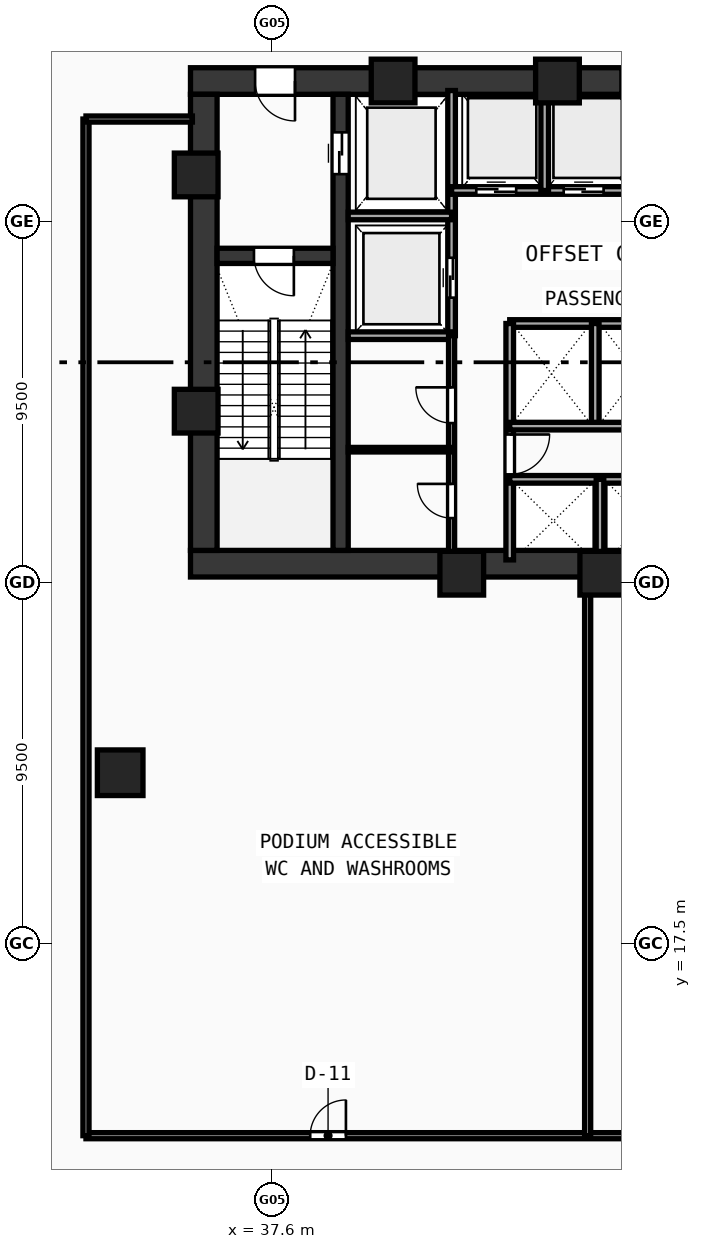
"""IFC4 building model, lengths in metres.
Left out: names, types, materials, properties, quantities, classifications, styles, units other than length and angle.
Written with IfcOpenShell. Run it as: python <this file> out.ifc"""

import sys

from ifc_helpers import new_model, si_unit, direction, frame, frame_2d, origin, origin_with_axes, origin_2d, place, context, subcontext, project, spatial, rectangle, hollow_rectangle, extrude, source, transform, mapped, element, fill, save


model = new_model("IFC4")
c1 = context("Model", 3, precision=1e-05, world=origin(), true_north=direction((0.0, 1.0)))
c2 = subcontext(c1, "Body", "Model", "MODEL_VIEW")
j1 = project(units=[si_unit("LENGTHUNIT", "METRE"), si_unit("PLANEANGLEUNIT", "RADIAN")], contexts=[c1])
p1 = place(None, origin())
s1 = spatial("IfcSite", under=j1, at=p1, CompositionType="ELEMENT")
p2 = place(p1, origin())
s2 = spatial("IfcBuilding", under=s1, at=p2, CompositionType="ELEMENT")
p3 = place(p2, frame((0.0, 0.0, 9.6)))
s3 = spatial("IfcBuildingStorey", under=s2, at=p3, CompositionType="ELEMENT", Elevation=9.6)
p4 = place(p3, frame((35.45, 27.5, 0.0), z_axis=(0.0, 0.0, 1.0), x_axis=(1.0, 0.0, 0.0)))
e1 = element("IfcWall", 1, at=p4, inside=s3, PredefinedType="SHEAR", context=c2, shape_type="SweptSolid", body=[
    extrude(rectangle(XDim=25.1, YDim=0.7, at=frame_2d((12.55, 0.0))), origin(), (0.0, 0.0, 1.0), 4.52),
])
p5 = place(p3, frame((35.45, 40.2, 0.0), z_axis=(0.0, 0.0, 1.0), x_axis=(1.0, 0.0, 0.0)))
e2 = element("IfcWall", 2, at=p5, inside=s3, PredefinedType="SHEAR", context=c2, shape_type="SweptSolid", body=[
    extrude(rectangle(XDim=11.35, YDim=0.7, at=frame_2d((5.675, 0.0))), origin(), (0.0, 0.0, 1.0), 4.52),
])
p6 = place(p5, frame((1.7, 0.0, 0.0)))
e3 = element("IfcOpeningElement", 3, at=p6, cuts=e2, PredefinedType="OPENING", context=c2, shape_type="SweptSolid", body=[
    extrude(rectangle(XDim=1.05, YDim=2.1, at=frame_2d((0.525, 1.05))), frame((0.0, 0.36, 0.0), z_axis=(0.0, -1.0, 0.0), x_axis=(1.0, 0.0, 0.0)), (0.0, 0.0, 1.0), 0.72),
])
p7 = place(p3, frame((35.8, 27.85, 0.0), z_axis=(0.0, 0.0, 1.0), x_axis=(0.0, 1.0, 0.0)))
e4 = element("IfcWall", 4, at=p7, inside=s3, PredefinedType="SHEAR", context=c2, shape_type="SweptSolid", body=[
    extrude(rectangle(XDim=12.0, YDim=0.7, at=frame_2d((6.0, 0.0))), origin(), (0.0, 0.0, 1.0), 4.52),
])
p8 = place(p3, frame((39.4, 27.85, 0.0), z_axis=(0.0, 0.0, 1.0), x_axis=(0.0, 1.0, 0.0)))
e5 = element("IfcWall", 5, at=p8, inside=s3, PredefinedType="SHEAR", context=c2, shape_type="SweptSolid", body=[
    extrude(rectangle(XDim=12.0, YDim=0.4, at=frame_2d((6.0, 0.0))), origin(), (0.0, 0.0, 1.0), 4.52),
])
p9 = place(p8, frame((9.9, 0.0, 0.0)))
e6 = element("IfcOpeningElement", 6, at=p9, cuts=e5, PredefinedType="OPENING", context=c2, shape_type="SweptSolid", body=[
    extrude(rectangle(XDim=1.1, YDim=2.1, at=frame_2d((0.55, 1.05))), frame((0.0, 0.21, 0.0), z_axis=(0.0, -1.0, 0.0), x_axis=(1.0, 0.0, 0.0)), (0.0, 0.0, 1.0), 0.42),
])
p10 = place(p3, frame((36.15, 35.6, 0.0), z_axis=(0.0, 0.0, 1.0), x_axis=(1.0, 0.0, 0.0)))
e7 = element("IfcWall", 7, at=p10, inside=s3, PredefinedType="SHEAR", context=c2, shape_type="SweptSolid", body=[
    extrude(rectangle(XDim=3.05, YDim=0.4, at=frame_2d((1.525, 0.0))), origin(), (0.0, 0.0, 1.0), 4.52),
])
p11 = place(p10, frame((0.97, 0.0, 0.0)))
e8 = element("IfcOpeningElement", 8, at=p11, cuts=e7, PredefinedType="OPENING", context=c2, shape_type="SweptSolid", body=[
    extrude(rectangle(XDim=1.05, YDim=2.1, at=frame_2d((0.525, 1.05))), frame((0.0, 0.21, 0.0), z_axis=(0.0, -1.0, 0.0), x_axis=(1.0, 0.0, 0.0)), (0.0, 0.0, 1.0), 0.42),
])
m1 = source(origin(), c2, "Body", "SweptSolid", [
    extrude(hollow_rectangle(XDim=1.15, YDim=1.15, WallThickness=0.048, at=origin_2d()), origin(), (0.0, 0.0, 1.0), 4.8),
])
for number, where, z_axis, x_axis in (
    (9, (42.588, 27.25, -0.28), (0.0, 0.0, 1.0), (1.0, 0.0, 0.0)),
    (10, (46.272, 27.25, -0.28), (0.0, 0.0, 1.0), (1.0, 0.0, 0.0)),
    (11, (45.106, 40.2, -0.28), (0.0, 0.0, 1.0), (1.0, 0.0, 0.0)),
    (12, (40.781, 40.2, -0.28), (0.0, 0.0, 1.0), (1.0, 0.0, 0.0)),
    (13, (35.6, 37.729, -0.28), (0.0, 0.0, 1.0), (1.0, 0.0, 0.0)),
    (14, (35.6, 31.513, -0.28), (0.0, 0.0, 1.0), (1.0, 0.0, 0.0)),
):
    element("IfcColumn", number, at=place(p3, frame(where, z_axis=z_axis, x_axis=x_axis)), inside=s3, PredefinedType="COLUMN", context=c2, shape_type="MappedRepresentation", body=[
        mapped(m1, transform((0.0, 0.0, 0.0), scale=1.0)),
    ])
m2 = source(origin(), c2, "Body", "SweptSolid", [
    extrude(hollow_rectangle(XDim=1.2, YDim=1.2, WallThickness=0.05, at=origin_2d()), origin(), (0.0, 0.0, 1.0), 4.8),
])
p12 = place(p3, frame((33.6, 22.0, -0.28), z_axis=(0.0, 0.0, 1.0), x_axis=(1.0, 0.0, 0.0)))
e15 = element("IfcColumn", 15, at=p12, inside=s3, PredefinedType="COLUMN", context=c2, shape_type="MappedRepresentation", body=[
    mapped(m2, transform((0.0, 0.0, 0.0), scale=1.0)),
])
p13 = place(p3, frame((42.32, 33.5, 0.0), z_axis=(0.0, 0.0, 1.0), x_axis=(0.0, 1.0, 0.0)))
e16 = element("IfcWall", 16, at=p13, inside=s3, PredefinedType="SOLIDWALL", context=c2, shape_type="SweptSolid", body=[
    extrude(rectangle(XDim=6.45, YDim=0.2, at=frame_2d((3.225, 0.0))), origin(), (0.0, 0.0, 1.0), 4.52),
])
p14 = place(p13, frame((1.0, 0.0, 0.0)))
e17 = element("IfcOpeningElement", 17, at=p14, cuts=e16, PredefinedType="OPENING", context=c2, shape_type="SweptSolid", body=[
    extrude(rectangle(XDim=1.05, YDim=2.1, at=frame_2d((0.525, 1.05))), frame((0.0, 0.11, 0.0), z_axis=(0.0, -1.0, 0.0), x_axis=(1.0, 0.0, 0.0)), (0.0, 0.0, 1.0), 0.22),
])
for number, where, z_axis, x_axis in (
    (18, (39.6, 36.65, 0.0), (0.0, 0.0, 1.0), (1.0, 0.0, 0.0)),
    (19, (39.6, 33.5, 0.0), (0.0, 0.0, 1.0), (1.0, 0.0, 0.0)),
):
    element("IfcWall", number, at=place(p3, frame(where, z_axis=z_axis, x_axis=x_axis)), inside=s3, PredefinedType="SOLIDWALL", context=c2, shape_type="SweptSolid", body=[
        extrude(rectangle(XDim=2.72, YDim=0.2, at=frame_2d((1.36, 0.0))), origin(), (0.0, 0.0, 1.0), 4.52),
    ])
p15 = place(p3, frame((42.32, 37.32, 0.0), z_axis=(0.0, 0.0, 1.0), x_axis=(1.0, 0.0, 0.0)))
e20 = element("IfcWall", 20, at=p15, inside=s3, PredefinedType="SOLIDWALL", context=c2, shape_type="SweptSolid", body=[
    extrude(rectangle(XDim=4.73, YDim=0.2, at=frame_2d((2.365, 0.0))), origin(), (0.0, 0.0, 1.0), 4.52),
])
p16 = place(p15, frame((0.65, 0.0, 0.0)))
e21 = element("IfcOpeningElement", 21, at=p16, cuts=e20, PredefinedType="OPENING", context=c2, shape_type="SweptSolid", body=[
    extrude(rectangle(XDim=1.05, YDim=2.1, at=frame_2d((0.525, 1.05))), frame((0.0, 0.11, 0.0), z_axis=(0.0, -1.0, 0.0), x_axis=(1.0, 0.0, 0.0)), (0.0, 0.0, 1.0), 0.22),
])
p17 = place(p15, frame((2.95, 0.0, 0.0)))
e22 = element("IfcOpeningElement", 22, at=p17, cuts=e20, PredefinedType="OPENING", context=c2, shape_type="SweptSolid", body=[
    extrude(rectangle(XDim=1.05, YDim=2.1, at=frame_2d((0.525, 1.05))), frame((0.0, 0.11, 0.0), z_axis=(0.0, -1.0, 0.0), x_axis=(1.0, 0.0, 0.0)), (0.0, 0.0, 1.0), 0.22),
])
p18 = place(p3, frame((44.77, 37.32, 0.0), z_axis=(0.0, 0.0, 1.0), x_axis=(0.0, 1.0, 0.0)))
e23 = element("IfcWall", 23, at=p18, inside=s3, PredefinedType="SOLIDWALL", context=c2, shape_type="SweptSolid", body=[
    extrude(rectangle(XDim=2.63, YDim=0.2, at=frame_2d((1.315, 0.0))), origin(), (0.0, 0.0, 1.0), 4.52),
])
p19 = place(p3, frame((43.85, 33.82, 0.0), z_axis=(0.0, 0.0, 1.0), x_axis=(1.0, 0.0, 0.0)))
e24 = element("IfcWall", 24, at=p19, inside=s3, PredefinedType="SOLIDWALL", context=c2, shape_type="SweptSolid", body=[
    extrude(rectangle(XDim=9.83, YDim=0.2, at=frame_2d((4.915, 0.0))), origin(), (0.0, 0.0, 1.0), 4.52),
])
p20 = place(p3, frame((43.85, 27.6, 0.0), z_axis=(0.0, 0.0, 1.0), x_axis=(0.0, 1.0, 0.0)))
e25 = element("IfcWall", 25, at=p20, inside=s3, PredefinedType="SOLIDWALL", context=c2, shape_type="SweptSolid", body=[
    extrude(rectangle(XDim=6.22, YDim=0.2, at=frame_2d((3.11, 0.0))), origin(), (0.0, 0.0, 1.0), 4.52),
])
p21 = place(p20, frame((2.25, 0.0, 0.0)))
e26 = element("IfcOpeningElement", 26, at=p21, cuts=e25, PredefinedType="OPENING", context=c2, shape_type="SweptSolid", body=[
    extrude(rectangle(XDim=1.05, YDim=2.1, at=frame_2d((0.525, 1.05))), frame((0.0, 0.11, 0.0), z_axis=(0.0, -1.0, 0.0), x_axis=(1.0, 0.0, 0.0)), (0.0, 0.0, 1.0), 0.22),
])
p22 = place(p3, frame((46.1, 31.12, 0.0), z_axis=(0.0, 0.0, 1.0), x_axis=(0.0, 1.0, 0.0)))
e27 = element("IfcWall", 27, at=p22, inside=s3, PredefinedType="SOLIDWALL", context=c2, shape_type="SweptSolid", body=[
    extrude(rectangle(XDim=2.7, YDim=0.2, at=frame_2d((1.35, 0.0))), origin(), (0.0, 0.0, 1.0), 4.52),
])
p23 = place(p3, frame((43.85, 29.72, 0.0), z_axis=(0.0, 0.0, 1.0), x_axis=(1.0, 0.0, 0.0)))
e28 = element("IfcWall", 28, at=p23, inside=s3, PredefinedType="SOLIDWALL", context=c2, shape_type="SweptSolid", body=[
    extrude(rectangle(XDim=7.2, YDim=0.2, at=frame_2d((3.6, 0.0))), origin(), (0.0, 0.0, 1.0), 4.52),
])
p24 = place(p3, frame((43.85, 31.12, 0.0), z_axis=(0.0, 0.0, 1.0), x_axis=(1.0, 0.0, 0.0)))
e29 = element("IfcWall", 29, at=p24, inside=s3, PredefinedType="SOLIDWALL", context=c2, shape_type="SweptSolid", body=[
    extrude(rectangle(XDim=9.83, YDim=0.2, at=frame_2d((4.915, 0.0))), origin(), (0.0, 0.0, 1.0), 4.52),
])
p25 = place(p3, frame((46.225, 27.6, 0.0), z_axis=(0.0, 0.0, 1.0), x_axis=(0.0, 1.0, 0.0)))
e30 = element("IfcWall", 30, at=p25, inside=s3, PredefinedType="SOLIDWALL", context=c2, shape_type="SweptSolid", body=[
    extrude(rectangle(XDim=2.12, YDim=0.2, at=frame_2d((1.06, 0.0))), origin(), (0.0, 0.0, 1.0), 4.52),
])
p26 = place(p3, frame((42.32, 27.6, 0.0), z_axis=(0.0, 0.0, 1.0), x_axis=(0.0, 1.0, 0.0)))
e31 = element("IfcWall", 31, at=p26, inside=s3, PredefinedType="PARTITIONING", context=c2, shape_type="SweptSolid", body=[
    extrude(rectangle(XDim=5.9, YDim=0.16, at=frame_2d((2.95, 0.0))), origin(), (0.0, 0.0, 1.0), 4.52),
])
p27 = place(p26, frame((1.1, 0.0, 0.0)))
e32 = element("IfcOpeningElement", 32, at=p27, cuts=e31, PredefinedType="OPENING", context=c2, shape_type="SweptSolid", body=[
    extrude(rectangle(XDim=0.9, YDim=2.1, at=frame_2d((0.45, 1.05))), frame((0.0, 0.09, 0.0), z_axis=(0.0, -1.0, 0.0), x_axis=(1.0, 0.0, 0.0)), (0.0, 0.0, 1.0), 0.18),
])
p28 = place(p26, frame((3.6, 0.0, 0.0)))
e33 = element("IfcOpeningElement", 33, at=p28, cuts=e31, PredefinedType="OPENING", context=c2, shape_type="SweptSolid", body=[
    extrude(rectangle(XDim=0.94, YDim=2.1, at=frame_2d((0.47, 1.05))), frame((0.0, 0.09, 0.0), z_axis=(0.0, -1.0, 0.0), x_axis=(1.0, 0.0, 0.0)), (0.0, 0.0, 1.0), 0.18),
])
p29 = place(p3, frame((39.6, 30.5, 0.0), z_axis=(0.0, 0.0, 1.0), x_axis=(1.0, 0.0, 0.0)))
e34 = element("IfcWall", 34, at=p29, inside=s3, PredefinedType="PARTITIONING", context=c2, shape_type="SweptSolid", body=[
    extrude(rectangle(XDim=2.72, YDim=0.12, at=frame_2d((1.36, 0.0))), origin(), (0.0, 0.0, 1.0), 4.52),
])
p30 = place(p3, frame((32.7, 12.45, 0.0), z_axis=(0.0, 0.0, 1.0), x_axis=(1.0, 0.0, 0.0)))
e35 = element("IfcWall", 35, at=p30, inside=s3, PredefinedType="PARTITIONING", context=c2, shape_type="SweptSolid", body=[
    extrude(rectangle(XDim=30.6, YDim=0.16, at=frame_2d((15.3, 0.0))), origin(), (0.0, 0.0, 1.0), 3.62),
])
p31 = place(p30, frame((16.2, 0.0, 0.0)))
e36 = element("IfcOpeningElement", 36, at=p31, cuts=e35, PredefinedType="OPENING", context=c2, shape_type="SweptSolid", body=[
    extrude(rectangle(XDim=0.92, YDim=2.1, at=frame_2d((0.46, 1.05))), frame((0.0, 0.09, 0.0), z_axis=(0.0, -1.0, 0.0), x_axis=(1.0, 0.0, 0.0)), (0.0, 0.0, 1.0), 0.18),
])
p32 = place(p30, frame((5.9, 0.0, 0.0)))
e37 = element("IfcOpeningElement", 37, at=p32, cuts=e35, PredefinedType="OPENING", context=c2, shape_type="SweptSolid", body=[
    extrude(rectangle(XDim=0.94, YDim=2.1, at=frame_2d((0.47, 1.05))), frame((0.0, 0.09, 0.0), z_axis=(0.0, -1.0, 0.0), x_axis=(1.0, 0.0, 0.0)), (0.0, 0.0, 1.0), 0.18),
])
p33 = place(p3, frame((32.7, 12.45, 0.0), z_axis=(0.0, 0.0, 1.0), x_axis=(0.0, 1.0, 0.0)))
e38 = element("IfcWall", 38, at=p33, inside=s3, PredefinedType="PARTITIONING", context=c2, shape_type="SweptSolid", body=[
    extrude(rectangle(XDim=26.75, YDim=0.16, at=frame_2d((13.375, 0.0))), origin(), (0.0, 0.0, 1.0), 3.62),
])
p34 = place(p3, frame((32.7, 39.2, 0.0), z_axis=(0.0, 0.0, 1.0), x_axis=(1.0, 0.0, 0.0)))
e39 = element("IfcWall", 39, at=p34, inside=s3, PredefinedType="PARTITIONING", context=c2, shape_type="SweptSolid", body=[
    extrude(rectangle(XDim=2.8, YDim=0.16, at=frame_2d((1.4, 0.0))), origin(), (0.0, 0.0, 1.0), 3.62),
])
p35 = place(p3, frame((45.9, 12.45, 0.0), z_axis=(0.0, 0.0, 1.0), x_axis=(0.0, 1.0, 0.0)))
e40 = element("IfcWall", 40, at=p35, inside=s3, PredefinedType="PARTITIONING", context=c2, shape_type="SweptSolid", body=[
    extrude(rectangle(XDim=15.05, YDim=0.16, at=frame_2d((7.525, 0.0))), origin(), (0.0, 0.0, 1.0), 3.62),
])
p36 = place(p3, frame((45.0, 34.4, 0.0), z_axis=(0.0, 0.0, 1.0), x_axis=(1.0, 0.0, 0.0)))
e41 = element("IfcWall", 41, at=p36, inside=s3, PredefinedType="MOVABLE", context=c2, shape_type="SweptSolid", body=[
    extrude(rectangle(XDim=6.0, YDim=0.11, at=frame_2d((3.0, 0.0))), origin(), (0.0, 0.0, 1.0), 2.5),
])
m3 = source(origin(), c2, "Body", "SweptSolid", [
    extrude(rectangle(XDim=1.05, YDim=2.1, at=frame_2d((0.525, 1.05))), frame((0.0, 0.025, 0.0), z_axis=(0.0, -1.0, 0.0), x_axis=(1.0, 0.0, 0.0)), (0.0, 0.0, 1.0), 0.05),
])
p37 = place(p11, frame((1.05, 0.0, 0.0), z_axis=(0.0, 0.0, 1.0), x_axis=(-1.0, 0.0, 0.0)))
e42 = element("IfcDoor", 42, at=p37, inside=s3, OperationType="SINGLE_SWING_LEFT", PredefinedType="DOOR", context=c2, shape_type="MappedRepresentation", body=[
    mapped(m3, transform((0.0, 0.0, 0.0), scale=1.0)),
])
fill(e8, e42)
p38 = place(p6, frame((1.05, 0.0, 0.0), z_axis=(0.0, 0.0, 1.0), x_axis=(-1.0, 0.0, 0.0)))
e43 = element("IfcDoor", 43, at=p38, inside=s3, OperationType="SINGLE_SWING_LEFT", PredefinedType="DOOR", context=c2, shape_type="MappedRepresentation", body=[
    mapped(m3, transform((0.0, 0.0, 0.0), scale=1.0)),
])
fill(e3, e43)
m4 = source(origin(), c2, "Body", "SweptSolid", [
    extrude(rectangle(XDim=1.1, YDim=2.1, at=frame_2d((0.55, 1.05))), frame((0.0, 0.025, 0.0), z_axis=(0.0, -1.0, 0.0), x_axis=(1.0, 0.0, 0.0)), (0.0, 0.0, 1.0), 0.05),
])
p39 = place(p9, frame((1.1, 0.0, 0.0), z_axis=(0.0, 0.0, 1.0), x_axis=(-1.0, 0.0, 0.0)))
e44 = element("IfcDoor", 44, at=p39, inside=s3, OperationType="DOUBLE_DOOR_SLIDING", PredefinedType="DOOR", context=c2, shape_type="MappedRepresentation", body=[
    mapped(m4, transform((0.0, 0.0, 0.0), scale=1.0)),
])
fill(e6, e44)
p40 = place(p14, origin_with_axes())
e45 = element("IfcDoor", 45, at=p40, inside=s3, OperationType="DOUBLE_DOOR_SLIDING", PredefinedType="DOOR", context=c2, shape_type="MappedRepresentation", body=[
    mapped(m3, transform((0.0, 0.0, 0.0), scale=1.0)),
])
fill(e17, e45)
p41 = place(p16, frame((1.05, 0.0, 0.0), z_axis=(0.0, 0.0, 1.0), x_axis=(-1.0, 0.0, 0.0)))
e46 = element("IfcDoor", 46, at=p41, inside=s3, OperationType="DOUBLE_DOOR_SLIDING", PredefinedType="DOOR", context=c2, shape_type="MappedRepresentation", body=[
    mapped(m3, transform((0.0, 0.0, 0.0), scale=1.0)),
])
fill(e21, e46)
p42 = place(p17, frame((1.05, 0.0, 0.0), z_axis=(0.0, 0.0, 1.0), x_axis=(-1.0, 0.0, 0.0)))
e47 = element("IfcDoor", 47, at=p42, inside=s3, OperationType="DOUBLE_DOOR_SLIDING", PredefinedType="DOOR", context=c2, shape_type="MappedRepresentation", body=[
    mapped(m3, transform((0.0, 0.0, 0.0), scale=1.0)),
])
fill(e22, e47)
p43 = place(p21, frame((1.05, 0.0, 0.0), z_axis=(0.0, 0.0, 1.0), x_axis=(-1.0, 0.0, 0.0)))
e48 = element("IfcDoor", 48, at=p43, inside=s3, OperationType="SINGLE_SWING_LEFT", PredefinedType="DOOR", context=c2, shape_type="MappedRepresentation", body=[
    mapped(m3, transform((0.0, 0.0, 0.0), scale=1.0)),
])
fill(e26, e48)
m5 = source(origin(), c2, "Body", "SweptSolid", [
    extrude(rectangle(XDim=0.9, YDim=2.1, at=frame_2d((0.45, 1.05))), frame((0.0, 0.025, 0.0), z_axis=(0.0, -1.0, 0.0), x_axis=(1.0, 0.0, 0.0)), (0.0, 0.0, 1.0), 0.05),
])
p44 = place(p27, origin_with_axes())
e49 = element("IfcDoor", 49, at=p44, inside=s3, OperationType="SINGLE_SWING_RIGHT", PredefinedType="DOOR", context=c2, shape_type="MappedRepresentation", body=[
    mapped(m5, transform((0.0, 0.0, 0.0), scale=1.0)),
])
fill(e32, e49)
m6 = source(origin(), c2, "Body", "SweptSolid", [
    extrude(rectangle(XDim=0.94, YDim=2.1, at=frame_2d((0.47, 1.05))), frame((0.0, 0.025, 0.0), z_axis=(0.0, -1.0, 0.0), x_axis=(1.0, 0.0, 0.0)), (0.0, 0.0, 1.0), 0.05),
])
p45 = place(p28, origin_with_axes())
e50 = element("IfcDoor", 50, at=p45, inside=s3, OperationType="SINGLE_SWING_RIGHT", PredefinedType="DOOR", context=c2, shape_type="MappedRepresentation", body=[
    mapped(m6, transform((0.0, 0.0, 0.0), scale=1.0)),
])
fill(e33, e50)
p46 = place(p32, origin_with_axes())
e51 = element("IfcDoor", 51, at=p46, inside=s3, OperationType="SINGLE_SWING_RIGHT", PredefinedType="DOOR", context=c2, shape_type="MappedRepresentation", body=[
    mapped(m6, transform((0.0, 0.0, 0.0), scale=1.0)),
])
fill(e37, e51)
save(model, sys.argv[1])
